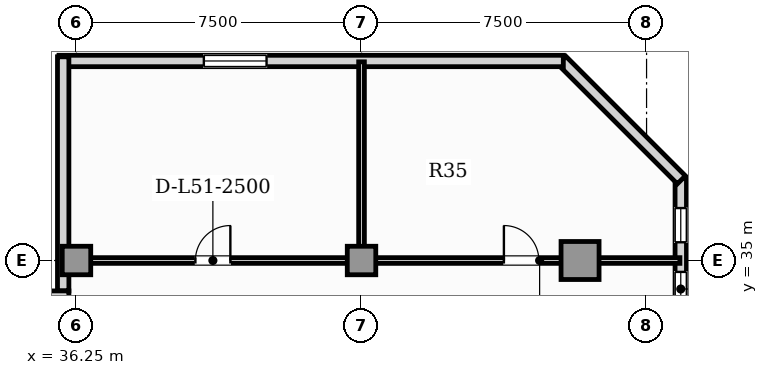
"""IFC4 building model, lengths in metres.
Left out: names, types, materials, properties, quantities, classifications, styles, units other than length and angle.
Written with IfcOpenShell. Run it as: python <this file> out.ifc"""

import sys

from ifc_helpers import new_model, si_unit, direction, frame, frame_2d, origin, origin_2d, place, context, subcontext, project, spatial, rectangle, hollow_rectangle, extrude, element, fill, save


model = new_model("IFC4")
c1 = context("Model", 3, precision=1e-05, world=origin(), true_north=direction((0.0, 1.0)))
c2 = subcontext(c1, "Body", "Model", "MODEL_VIEW")
j1 = project(units=[si_unit("LENGTHUNIT", "METRE"), si_unit("PLANEANGLEUNIT", "RADIAN")], contexts=[c1])
p1 = place(None, origin())
s1 = spatial("IfcSite", under=j1, at=p1, CompositionType="ELEMENT")
p2 = place(p1, origin())
s2 = spatial("IfcBuilding", under=s1, at=p2, CompositionType="ELEMENT")
p3 = place(p2, frame((0.0, 0.0, 208.0)))
s3 = spatial("IfcBuildingStorey", under=s2, at=p3, CompositionType="ELEMENT", Elevation=208.0)
p4 = place(p3, frame((49.5, 35.0, 0.0), z_axis=(0.0, 0.0, 1.0), x_axis=(1.0, 0.0, 0.0)))
e1 = element("IfcColumn", 1, at=p4, inside=s3, PredefinedType="USERDEFINED", context=c2, shape_type="SweptSolid", body=[
    extrude(hollow_rectangle(XDim=1.0, YDim=1.0, WallThickness=0.06, at=origin_2d()), origin(), (0.0, 0.0, 1.0), 3.85),
])
for number, where, z_axis, x_axis in (
    (2, (36.25, 35.0, 0.0), (0.0, 0.0, 1.0), (1.0, 0.0, 0.0)),
    (3, (43.75, 35.0, 0.0), (0.0, 0.0, 1.0), (1.0, 0.0, 0.0)),
):
    element("IfcColumn", number, at=place(p3, frame(where, z_axis=z_axis, x_axis=x_axis)), inside=s3, PredefinedType="COLUMN", context=c2, shape_type="SweptSolid", body=[
        extrude(rectangle(XDim=0.75, YDim=0.75, at=origin_2d()), origin(), (0.0, 0.0, 1.0), 3.85),
    ])
p5 = place(p3, frame((52.15, 3.24, 0.0), z_axis=(0.0, 0.0, 1.0), x_axis=(0.0, 1.0, 0.0)))
e4 = element("IfcWall", 4, at=p5, inside=s3, PredefinedType="SOLIDWALL", context=c2, shape_type="SweptSolid", body=[
    extrude(rectangle(XDim=33.92, YDim=0.3, at=frame_2d((16.96, 0.0))), origin(), (0.0, 0.0, 1.0), 3.63),
])
p6 = place(p5, frame((30.56, 0.0, 0.95)))
e5 = element("IfcOpeningElement", 5, at=p6, cuts=e4, PredefinedType="OPENING", context=c2, shape_type="SweptSolid", body=[
    extrude(rectangle(XDim=0.9, YDim=1.5, at=frame_2d((0.45, 0.75))), frame((0.0, 0.16, 0.0), z_axis=(0.0, -1.0, 0.0), x_axis=(1.0, 0.0, 0.0)), (0.0, 0.0, 1.0), 0.32),
])
p7 = place(p5, frame((11.108, 0.0, 0.95)))
e6 = element("IfcOpeningElement", 6, at=p7, cuts=e4, PredefinedType="OPENING", context=c2, shape_type="SweptSolid", body=[
    extrude(rectangle(XDim=0.9, YDim=1.5, at=frame_2d((0.45, 0.75))), frame((0.0, 0.16, 0.0), z_axis=(0.0, -1.0, 0.0), x_axis=(1.0, 0.0, 0.0)), (0.0, 0.0, 1.0), 0.32),
])
p8 = place(p5, frame((14.393, 0.0, 0.88)))
e7 = element("IfcOpeningElement", 7, at=p8, cuts=e4, PredefinedType="OPENING", context=c2, shape_type="SweptSolid", body=[
    extrude(rectangle(XDim=1.65, YDim=2.0, at=frame_2d((0.825, 1.0))), frame((0.0, 0.16, 0.0), z_axis=(0.0, -1.0, 0.0), x_axis=(1.0, 0.0, 0.0)), (0.0, 0.0, 1.0), 0.32),
])
p9 = place(p5, frame((19.657, 0.0, 0.88)))
e8 = element("IfcOpeningElement", 8, at=p9, cuts=e4, PredefinedType="OPENING", context=c2, shape_type="SweptSolid", body=[
    extrude(rectangle(XDim=1.65, YDim=2.0, at=frame_2d((0.825, 1.0))), frame((0.0, 0.16, 0.0), z_axis=(0.0, -1.0, 0.0), x_axis=(1.0, 0.0, 0.0)), (0.0, 0.0, 1.0), 0.32),
])
p10 = place(p5, frame((25.862, 0.0, 0.88)))
e9 = element("IfcOpeningElement", 9, at=p10, cuts=e4, PredefinedType="OPENING", context=c2, shape_type="SweptSolid", body=[
    extrude(rectangle(XDim=1.65, YDim=2.0, at=frame_2d((0.825, 1.0))), frame((0.0, 0.16, 0.0), z_axis=(0.0, -1.0, 0.0), x_axis=(1.0, 0.0, 0.0)), (0.0, 0.0, 1.0), 0.32),
])
p11 = place(p5, frame((32.24, 0.0, 0.95)))
e10 = element("IfcOpeningElement", 10, at=p11, cuts=e4, PredefinedType="OPENING", context=c2, shape_type="SweptSolid", body=[
    extrude(rectangle(XDim=0.9, YDim=1.5, at=frame_2d((0.45, 0.75))), frame((0.0, 0.16, 0.0), z_axis=(0.0, -1.0, 0.0), x_axis=(1.0, 0.0, 0.0)), (0.0, 0.0, 1.0), 0.32),
])
p12 = place(p3, frame((52.166, 37.122, 0.0), z_axis=(0.0, 0.0, 1.0), x_axis=(-0.707106781187, 0.707106781187, 0.0)))
e11 = element("IfcWall", 11, at=p12, inside=s3, PredefinedType="SOLIDWALL", context=c2, shape_type="SweptSolid", body=[
    extrude(rectangle(XDim=4.445, YDim=0.3, at=frame_2d((2.223, 0.0))), origin(), (0.0, 0.0, 1.0), 3.63),
])
p13 = place(p3, frame((49.06, 40.25, 0.0), z_axis=(0.0, 0.0, 1.0), x_axis=(-1.0, 0.0, 0.0)))
e12 = element("IfcWall", 12, at=p13, inside=s3, PredefinedType="SOLIDWALL", context=c2, shape_type="SweptSolid", body=[
    extrude(rectangle(XDim=13.27, YDim=0.3, at=frame_2d((6.635, 0.0))), origin(), (0.0, 0.0, 1.0), 3.63),
])
p14 = place(p13, frame((7.809, 0.0, 0.88)))
e13 = element("IfcOpeningElement", 13, at=p14, cuts=e12, PredefinedType="OPENING", context=c2, shape_type="SweptSolid", body=[
    extrude(rectangle(XDim=1.65, YDim=2.0, at=frame_2d((0.825, 1.0))), frame((0.0, 0.16, 0.0), z_axis=(0.0, -1.0, 0.0), x_axis=(1.0, 0.0, 0.0)), (0.0, 0.0, 1.0), 0.32),
])
p15 = place(p3, frame((35.9, 40.36, 0.0), z_axis=(0.0, 0.0, 1.0), x_axis=(0.0, -1.0, 0.0)))
e14 = element("IfcWall", 14, at=p15, inside=s3, PredefinedType="SOLIDWALL", context=c2, shape_type="SweptSolid", body=[
    extrude(rectangle(XDim=6.16, YDim=0.3, at=frame_2d((3.08, 0.0))), origin(), (0.0, 0.0, 1.0), 3.63),
])
p16 = place(p3, frame((34.25, 34.05, 0.0), z_axis=(0.0, 0.0, 1.0), x_axis=(1.0, 0.0, 0.0)))
e15 = element("IfcWall", 15, at=p16, inside=s3, PredefinedType="SOLIDWALL", context=c2, shape_type="SweptSolid", body=[
    extrude(rectangle(XDim=1.8, YDim=0.3, at=frame_2d((0.9, 0.0))), origin(), (0.0, 0.0, 1.0), 3.63),
])
p17 = place(p3, frame((35.923, 35.0, 0.0), z_axis=(0.0, 0.0, 1.0), x_axis=(1.0, 0.0, 0.0)))
e16 = element("IfcWall", 16, at=p17, inside=s3, PredefinedType="PARTITIONING", context=c2, shape_type="SweptSolid", body=[
    extrude(rectangle(XDim=7.832, YDim=0.15, at=frame_2d((3.916, 0.0))), origin(), (0.0, 0.0, 1.0), 3.085),
])
p18 = place(p17, frame((3.456, 0.0, 0.0)))
e17 = element("IfcOpeningElement", 17, at=p18, cuts=e16, PredefinedType="OPENING", context=c2, shape_type="SweptSolid", body=[
    extrude(rectangle(XDim=0.92, YDim=2.1, at=frame_2d((0.46, 1.05))), frame((0.0, 0.085, 0.0), z_axis=(0.0, -1.0, 0.0), x_axis=(1.0, 0.0, 0.0)), (0.0, 0.0, 1.0), 0.17),
])
p19 = place(p3, frame((43.785, 35.0, 0.0), z_axis=(0.0, 0.0, 1.0), x_axis=(1.0, 0.0, 0.0)))
e18 = element("IfcWall", 18, at=p19, inside=s3, PredefinedType="PARTITIONING", context=c2, shape_type="SweptSolid", body=[
    extrude(rectangle(XDim=8.343, YDim=0.15, at=frame_2d((4.171, 0.0))), origin(), (0.0, 0.0, 1.0), 3.085),
])
p20 = place(p19, frame((3.711, 0.0, 0.0)))
e19 = element("IfcOpeningElement", 19, at=p20, cuts=e18, PredefinedType="OPENING", context=c2, shape_type="SweptSolid", body=[
    extrude(rectangle(XDim=0.92, YDim=2.1, at=frame_2d((0.46, 1.05))), frame((0.0, 0.085, 0.0), z_axis=(0.0, -1.0, 0.0), x_axis=(1.0, 0.0, 0.0)), (0.0, 0.0, 1.0), 0.17),
])
p21 = place(p3, frame((43.75, 34.995, 0.0), z_axis=(0.0, 0.0, 1.0), x_axis=(0.0, 1.0, 0.0)))
e20 = element("IfcWall", 20, at=p21, inside=s3, PredefinedType="PARTITIONING", context=c2, shape_type="SweptSolid", body=[
    extrude(rectangle(XDim=5.232, YDim=0.15, at=frame_2d((2.616, 0.0))), origin(), (0.0, 0.0, 1.0), 3.63),
])
p22 = place(p6, origin())
e21 = element("IfcWindow", 21, at=p22, inside=s3, PartitioningType="SINGLE_PANEL", PredefinedType="WINDOW", context=c2, shape_type="SweptSolid", body=[
    extrude(rectangle(XDim=0.9, YDim=1.5, at=frame_2d((0.45, 0.75))), frame((0.0, 0.03, 0.0), z_axis=(0.0, -1.0, 0.0), x_axis=(1.0, 0.0, 0.0)), (0.0, 0.0, 1.0), 0.06),
])
fill(e5, e21)
p23 = place(p14, origin())
e22 = element("IfcWindow", 22, at=p23, inside=s3, PartitioningType="SINGLE_PANEL", PredefinedType="WINDOW", context=c2, shape_type="SweptSolid", body=[
    extrude(rectangle(XDim=1.65, YDim=2.0, at=frame_2d((0.825, 1.0))), frame((0.0, 0.03, 0.0), z_axis=(0.0, -1.0, 0.0), x_axis=(1.0, 0.0, 0.0)), (0.0, 0.0, 1.0), 0.06),
])
fill(e13, e22)
p24 = place(p11, origin())
e23 = element("IfcWindow", 23, at=p24, inside=s3, PartitioningType="SINGLE_PANEL", PredefinedType="WINDOW", context=c2, shape_type="SweptSolid", body=[
    extrude(rectangle(XDim=0.9, YDim=1.5, at=frame_2d((0.45, 0.75))), frame((0.0, 0.03, 0.0), z_axis=(0.0, -1.0, 0.0), x_axis=(1.0, 0.0, 0.0)), (0.0, 0.0, 1.0), 0.06),
])
fill(e10, e23)
p25 = place(p18, origin())
e24 = element("IfcDoor", 24, at=p25, inside=s3, OperationType="SINGLE_SWING_RIGHT", PredefinedType="DOOR", context=c2, shape_type="SweptSolid", body=[
    extrude(rectangle(XDim=0.92, YDim=2.1, at=frame_2d((0.46, 1.05))), frame((0.0, 0.025, 0.0), z_axis=(0.0, -1.0, 0.0), x_axis=(1.0, 0.0, 0.0)), (0.0, 0.0, 1.0), 0.05),
])
fill(e17, e24)
p26 = place(p20, origin())
e25 = element("IfcDoor", 25, at=p26, inside=s3, OperationType="SINGLE_SWING_LEFT", PredefinedType="DOOR", context=c2, shape_type="SweptSolid", body=[
    extrude(rectangle(XDim=0.92, YDim=2.1, at=frame_2d((0.46, 1.05))), frame((0.0, 0.025, 0.0), z_axis=(0.0, -1.0, 0.0), x_axis=(1.0, 0.0, 0.0)), (0.0, 0.0, 1.0), 0.05),
])
fill(e19, e25)
save(model, sys.argv[1])
